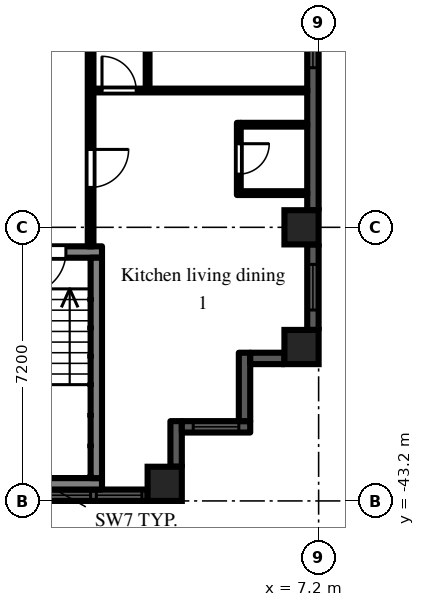
"""IFC4 building model, lengths in metres.
Left out: names, types, materials, properties, quantities, classifications, styles, units other than length and angle.
Written with IfcOpenShell. Run it as: python <this file> out.ifc"""

import sys

from ifc_helpers import new_model, si_unit, direction, frame, frame_2d, origin, origin_2d, place, context, subcontext, project, spatial, rectangle, extrude, element, fill, save


model = new_model("IFC4")
c1 = context("Model", 3, precision=1e-05, world=origin(), true_north=direction((0.0, 1.0)))
c2 = subcontext(c1, "Body", "Model", "MODEL_VIEW")
j1 = project(units=[si_unit("LENGTHUNIT", "METRE"), si_unit("PLANEANGLEUNIT", "RADIAN")], contexts=[c1])
p1 = place(None, origin())
s1 = spatial("IfcSite", under=j1, at=p1, CompositionType="ELEMENT")
p2 = place(p1, origin())
s2 = spatial("IfcBuilding", under=s1, at=p2, CompositionType="ELEMENT")
p3 = place(p2, frame((0.0, 0.0, 108.9)))
s3 = spatial("IfcBuildingStorey", under=s2, at=p3, CompositionType="ELEMENT", Elevation=108.9)
for number, where, z_axis, x_axis in (
    (1, (3.15, -42.75, 0.0), (0.0, 0.0, 1.0), (1.0, 0.0, 0.0)),
    (2, (6.75, -39.15, 0.0), (0.0, 0.0, 1.0), (1.0, 0.0, 0.0)),
    (3, (6.75, -36.0, 0.0), (0.0, 0.0, 1.0), (1.0, 0.0, 0.0)),
):
    element("IfcColumn", number, at=place(p3, frame(where, z_axis=z_axis, x_axis=x_axis)), inside=s3, PredefinedType="COLUMN", context=c2, shape_type="SweptSolid", body=[
        extrude(rectangle(XDim=0.9, YDim=0.9, at=origin_2d()), origin(), (0.0, 0.0, 1.0), 3.0),
    ])
p4 = place(p3, frame((-2.7, -43.05, 0.0), z_axis=(0.0, 0.0, 1.0), x_axis=(1.0, 0.0, 0.0)))
e4 = element("IfcWall", 4, at=p4, inside=s3, PredefinedType="SOLIDWALL", context=c2, shape_type="SweptSolid", body=[
    extrude(rectangle(XDim=5.4, YDim=0.3, at=frame_2d((2.7, 0.0))), origin(), (0.0, 0.0, 1.0), 2.2),
])
p5 = place(p4, frame((1.5, 0.0, 0.2)))
e5 = element("IfcOpeningElement", 5, at=p5, cuts=e4, PredefinedType="OPENING", context=c2, shape_type="SweptSolid", body=[
    extrude(rectangle(XDim=2.4, YDim=1.85, at=frame_2d((1.2, 0.925))), frame((0.0, 0.16, 0.0), z_axis=(0.0, -1.0, 0.0), x_axis=(1.0, 0.0, 0.0)), (0.0, 0.0, 1.0), 0.32),
])
p6 = place(p4, frame((0.15, 0.0, 0.2)))
e6 = element("IfcOpeningElement", 6, at=p6, cuts=e4, PredefinedType="OPENING", context=c2, shape_type="SweptSolid", body=[
    extrude(rectangle(XDim=1.2, YDim=1.85, at=frame_2d((0.6, 0.925))), frame((0.0, 0.16, 0.0), z_axis=(0.0, -1.0, 0.0), x_axis=(1.0, 0.0, 0.0)), (0.0, 0.0, 1.0), 0.32),
])
p7 = place(p4, frame((4.05, 0.0, 0.2)))
e7 = element("IfcOpeningElement", 7, at=p7, cuts=e4, PredefinedType="OPENING", context=c2, shape_type="SweptSolid", body=[
    extrude(rectangle(XDim=1.2, YDim=1.85, at=frame_2d((0.6, 0.925))), frame((0.0, 0.16, 0.0), z_axis=(0.0, -1.0, 0.0), x_axis=(1.0, 0.0, 0.0)), (0.0, 0.0, 1.0), 0.32),
])
p8 = place(p3, frame((3.45, -42.3, 0.0), z_axis=(0.0, 0.0, 1.0), x_axis=(0.0, 1.0, 0.0)))
e8 = element("IfcWall", 8, at=p8, inside=s3, PredefinedType="SOLIDWALL", context=c2, shape_type="SweptSolid", body=[
    extrude(rectangle(XDim=1.2, YDim=0.3, at=frame_2d((0.6, 0.0))), origin(), (0.0, 0.0, 1.0), 2.55),
])
p9 = place(p3, frame((3.6, -41.25, 0.0), z_axis=(0.0, 0.0, 1.0), x_axis=(1.0, 0.0, 0.0)))
e9 = element("IfcWall", 9, at=p9, inside=s3, PredefinedType="SOLIDWALL", context=c2, shape_type="SweptSolid", body=[
    extrude(rectangle(XDim=1.8, YDim=0.3, at=frame_2d((0.9, 0.0))), origin(), (0.0, 0.0, 1.0), 2.55),
])
p10 = place(p9, frame((0.3, 0.0, 0.2)))
e10 = element("IfcOpeningElement", 10, at=p10, cuts=e9, PredefinedType="OPENING", context=c2, shape_type="SweptSolid", body=[
    extrude(rectangle(XDim=1.2, YDim=1.85, at=frame_2d((0.6, 0.925))), frame((0.0, 0.16, 0.0), z_axis=(0.0, -1.0, 0.0), x_axis=(1.0, 0.0, 0.0)), (0.0, 0.0, 1.0), 0.32),
])
p11 = place(p3, frame((5.25, -41.1, 0.0), z_axis=(0.0, 0.0, 1.0), x_axis=(0.0, 1.0, 0.0)))
e11 = element("IfcWall", 11, at=p11, inside=s3, PredefinedType="SOLIDWALL", context=c2, shape_type="SweptSolid", body=[
    extrude(rectangle(XDim=1.8, YDim=0.3, at=frame_2d((0.9, 0.0))), origin(), (0.0, 0.0, 1.0), 2.55),
])
p12 = place(p3, frame((5.4, -39.45, 0.0), z_axis=(0.0, 0.0, 1.0), x_axis=(1.0, 0.0, 0.0)))
e12 = element("IfcWall", 12, at=p12, inside=s3, PredefinedType="SOLIDWALL", context=c2, shape_type="SweptSolid", body=[
    extrude(rectangle(XDim=0.9, YDim=0.3, at=frame_2d((0.45, 0.0))), origin(), (0.0, 0.0, 1.0), 2.55),
])
p13 = place(p3, frame((7.05, -38.7, 0.0), z_axis=(0.0, 0.0, 1.0), x_axis=(0.0, 1.0, 0.0)))
e13 = element("IfcWall", 13, at=p13, inside=s3, PredefinedType="SOLIDWALL", context=c2, shape_type="SweptSolid", body=[
    extrude(rectangle(XDim=2.25, YDim=0.3, at=frame_2d((1.125, 0.0))), origin(), (0.0, 0.0, 1.0), 2.2),
])
p14 = place(p13, frame((0.525, 0.0, 0.2)))
e14 = element("IfcOpeningElement", 14, at=p14, cuts=e13, PredefinedType="OPENING", context=c2, shape_type="SweptSolid", body=[
    extrude(rectangle(XDim=1.2, YDim=1.85, at=frame_2d((0.6, 0.925))), frame((0.0, 0.16, 0.0), z_axis=(0.0, -1.0, 0.0), x_axis=(1.0, 0.0, 0.0)), (0.0, 0.0, 1.0), 0.32),
])
p15 = place(p3, frame((7.05, -35.55, 0.0), z_axis=(0.0, 0.0, 1.0), x_axis=(0.0, 1.0, 0.0)))
e15 = element("IfcWall", 15, at=p15, inside=s3, PredefinedType="SOLIDWALL", context=c2, shape_type="SweptSolid", body=[
    extrude(rectangle(XDim=6.3, YDim=0.3, at=frame_2d((3.15, 0.0))), origin(), (0.0, 0.0, 1.0), 2.2),
])
p16 = place(p15, frame((3.75, 0.0, 0.2)))
e16 = element("IfcOpeningElement", 16, at=p16, cuts=e15, PredefinedType="OPENING", context=c2, shape_type="SweptSolid", body=[
    extrude(rectangle(XDim=2.4, YDim=1.85, at=frame_2d((1.2, 0.925))), frame((0.0, 0.16, 0.0), z_axis=(0.0, -1.0, 0.0), x_axis=(1.0, 0.0, 0.0)), (0.0, 0.0, 1.0), 0.32),
])
p17 = place(p3, frame((-1.5, -36.65, 0.0), z_axis=(0.0, 0.0, 1.0), x_axis=(1.0, 0.0, 0.0)))
e17 = element("IfcWall", 17, at=p17, inside=s3, PredefinedType="SHEAR", context=c2, shape_type="SweptSolid", body=[
    extrude(rectangle(XDim=3.0, YDim=0.3, at=frame_2d((1.5, 0.0))), origin(), (0.0, 0.0, 1.0), 2.55),
])
p18 = place(p17, frame((0.95, 0.0, 0.0)))
e18 = element("IfcOpeningElement", 18, at=p18, cuts=e17, PredefinedType="OPENING", context=c2, shape_type="SweptSolid", body=[
    extrude(rectangle(XDim=1.1, YDim=2.1, at=frame_2d((0.55, 1.05))), frame((0.0, 0.16, 0.0), z_axis=(0.0, -1.0, 0.0), x_axis=(1.0, 0.0, 0.0)), (0.0, 0.0, 1.0), 0.32),
])
p19 = place(p3, frame((-1.5, -42.75, 0.0), z_axis=(0.0, 0.0, 1.0), x_axis=(1.0, 0.0, 0.0)))
e19 = element("IfcWall", 19, at=p19, inside=s3, PredefinedType="SHEAR", context=c2, shape_type="SweptSolid", body=[
    extrude(rectangle(XDim=3.0, YDim=0.3, at=frame_2d((1.5, 0.0))), origin(), (0.0, 0.0, 1.0), 2.55),
])
p20 = place(p3, frame((1.35, -36.8, 0.0), z_axis=(0.0, 0.0, 1.0), x_axis=(0.0, -1.0, 0.0)))
e20 = element("IfcWall", 20, at=p20, inside=s3, PredefinedType="SHEAR", context=c2, shape_type="SweptSolid", body=[
    extrude(rectangle(XDim=5.8, YDim=0.3, at=frame_2d((2.9, 0.0))), origin(), (0.0, 0.0, 1.0), 2.55),
])
p21 = place(p3, frame((1.2, -36.5, 0.0), z_axis=(0.0, 0.0, 1.0), x_axis=(0.0, 1.0, 0.0)))
e21 = element("IfcWall", 21, at=p21, inside=s3, PredefinedType="PARTITIONING", context=c2, shape_type="SweptSolid", body=[
    extrude(rectangle(XDim=35.375, YDim=0.15, at=frame_2d((17.688, 0.0))), origin(), (0.0, 0.0, 1.0), 2.55),
])
p22 = place(p21, frame((33.65, 0.0, 0.0)))
e22 = element("IfcOpeningElement", 22, at=p22, cuts=e21, PredefinedType="OPENING", context=c2, shape_type="SweptSolid", body=[
    extrude(rectangle(XDim=0.9, YDim=2.1, at=frame_2d((0.45, 1.05))), frame((0.0, 0.085, 0.0), z_axis=(0.0, -1.0, 0.0), x_axis=(1.0, 0.0, 0.0)), (0.0, 0.0, 1.0), 0.17),
])
p23 = place(p21, frame((30.65, 0.0, 0.0)))
e23 = element("IfcOpeningElement", 23, at=p23, cuts=e21, PredefinedType="OPENING", context=c2, shape_type="SweptSolid", body=[
    extrude(rectangle(XDim=0.9, YDim=2.1, at=frame_2d((0.45, 1.05))), frame((0.0, 0.085, 0.0), z_axis=(0.0, -1.0, 0.0), x_axis=(1.0, 0.0, 0.0)), (0.0, 0.0, 1.0), 0.17),
])
p24 = place(p21, frame((23.45, 0.0, 0.0)))
e24 = element("IfcOpeningElement", 24, at=p24, cuts=e21, PredefinedType="OPENING", context=c2, shape_type="SweptSolid", body=[
    extrude(rectangle(XDim=0.9, YDim=2.1, at=frame_2d((0.45, 1.05))), frame((0.0, 0.085, 0.0), z_axis=(0.0, -1.0, 0.0), x_axis=(1.0, 0.0, 0.0)), (0.0, 0.0, 1.0), 0.17),
])
p25 = place(p21, frame((20.75, 0.0, 0.0)))
e25 = element("IfcOpeningElement", 25, at=p25, cuts=e21, PredefinedType="OPENING", context=c2, shape_type="SweptSolid", body=[
    extrude(rectangle(XDim=0.9, YDim=2.1, at=frame_2d((0.45, 1.05))), frame((0.0, 0.085, 0.0), z_axis=(0.0, -1.0, 0.0), x_axis=(1.0, 0.0, 0.0)), (0.0, 0.0, 1.0), 0.17),
])
p26 = place(p21, frame((18.95, 0.0, 0.0)))
e26 = element("IfcOpeningElement", 26, at=p26, cuts=e21, PredefinedType="OPENING", context=c2, shape_type="SweptSolid", body=[
    extrude(rectangle(XDim=0.9, YDim=2.1, at=frame_2d((0.45, 1.05))), frame((0.0, 0.085, 0.0), z_axis=(0.0, -1.0, 0.0), x_axis=(1.0, 0.0, 0.0)), (0.0, 0.0, 1.0), 0.17),
])
p27 = place(p21, frame((1.55, 0.0, 0.0)))
e27 = element("IfcOpeningElement", 27, at=p27, cuts=e21, PredefinedType="OPENING", context=c2, shape_type="SweptSolid", body=[
    extrude(rectangle(XDim=1.0, YDim=2.1, at=frame_2d((0.5, 1.05))), frame((0.0, 0.085, 0.0), z_axis=(0.0, -1.0, 0.0), x_axis=(1.0, 0.0, 0.0)), (0.0, 0.0, 1.0), 0.17),
])
p28 = place(p3, frame((1.275, -32.4, 0.0), z_axis=(0.0, 0.0, 1.0), x_axis=(1.0, 0.0, 0.0)))
e28 = element("IfcWall", 28, at=p28, inside=s3, PredefinedType="PARTITIONING", context=c2, shape_type="SweptSolid", body=[
    extrude(rectangle(XDim=5.625, YDim=0.1, at=frame_2d((2.812, 0.0))), origin(), (0.0, 0.0, 1.0), 2.55),
])
p29 = place(p28, frame((0.225, 0.0, 0.0)))
e29 = element("IfcOpeningElement", 29, at=p29, cuts=e28, PredefinedType="OPENING", context=c2, shape_type="SweptSolid", body=[
    extrude(rectangle(XDim=0.9, YDim=2.1, at=frame_2d((0.45, 1.05))), frame((0.0, 0.06, 0.0), z_axis=(0.0, -1.0, 0.0), x_axis=(1.0, 0.0, 0.0)), (0.0, 0.0, 1.0), 0.12),
])
p30 = place(p3, frame((2.7, -32.35, 0.0), z_axis=(0.0, 0.0, 1.0), x_axis=(0.0, 1.0, 0.0)))
e30 = element("IfcWall", 30, at=p30, inside=s3, PredefinedType="PARTITIONING", context=c2, shape_type="SweptSolid", body=[
    extrude(rectangle(XDim=14.275, YDim=0.1, at=frame_2d((7.138, 0.0))), origin(), (0.0, 0.0, 1.0), 2.55),
])
p31 = place(p30, frame((1.12, 0.0, 0.0)))
e31 = element("IfcOpeningElement", 31, at=p31, cuts=e30, PredefinedType="OPENING", context=c2, shape_type="SweptSolid", body=[
    extrude(rectangle(XDim=0.9, YDim=2.1, at=frame_2d((0.45, 1.05))), frame((0.0, 0.06, 0.0), z_axis=(0.0, -1.0, 0.0), x_axis=(1.0, 0.0, 0.0)), (0.0, 0.0, 1.0), 0.12),
])
p32 = place(p30, frame((12.28, 0.0, 0.0)))
e32 = element("IfcOpeningElement", 32, at=p32, cuts=e30, PredefinedType="OPENING", context=c2, shape_type="SweptSolid", body=[
    extrude(rectangle(XDim=0.9, YDim=2.1, at=frame_2d((0.45, 1.05))), frame((0.0, 0.06, 0.0), z_axis=(0.0, -1.0, 0.0), x_axis=(1.0, 0.0, 0.0)), (0.0, 0.0, 1.0), 0.12),
])
p33 = place(p3, frame((5.1, -35.15, 0.0), z_axis=(0.0, 0.0, 1.0), x_axis=(0.0, 1.0, 0.0)))
e33 = element("IfcWall", 33, at=p33, inside=s3, PredefinedType="PARTITIONING", context=c2, shape_type="SweptSolid", body=[
    extrude(rectangle(XDim=1.9, YDim=0.1, at=frame_2d((0.95, 0.0))), origin(), (0.0, 0.0, 1.0), 2.55),
])
p34 = place(p33, frame((0.55, 0.0, 0.0)))
e34 = element("IfcOpeningElement", 34, at=p34, cuts=e33, PredefinedType="OPENING", context=c2, shape_type="SweptSolid", body=[
    extrude(rectangle(XDim=0.8, YDim=2.1, at=frame_2d((0.4, 1.05))), frame((0.0, 0.06, 0.0), z_axis=(0.0, -1.0, 0.0), x_axis=(1.0, 0.0, 0.0)), (0.0, 0.0, 1.0), 0.12),
])
for number, where, z_axis, x_axis in (
    (35, (5.15, -35.1, 0.0), (0.0, 0.0, 1.0), (1.0, 0.0, 0.0)),
    (36, (5.15, -33.3, 0.0), (0.0, 0.0, 1.0), (1.0, 0.0, 0.0)),
):
    element("IfcWall", number, at=place(p3, frame(where, z_axis=z_axis, x_axis=x_axis)), inside=s3, PredefinedType="PARTITIONING", context=c2, shape_type="SweptSolid", body=[
        extrude(rectangle(XDim=1.75, YDim=0.1, at=frame_2d((0.875, 0.0))), origin(), (0.0, 0.0, 1.0), 2.55),
    ])
p35 = place(p5, origin())
e37 = element("IfcWindow", 37, at=p35, inside=s3, PartitioningType="SINGLE_PANEL", PredefinedType="WINDOW", context=c2, shape_type="SweptSolid", body=[
    extrude(rectangle(XDim=2.4, YDim=1.85, at=frame_2d((1.2, 0.925))), frame((0.0, 0.03, 0.0), z_axis=(0.0, -1.0, 0.0), x_axis=(1.0, 0.0, 0.0)), (0.0, 0.0, 1.0), 0.06),
])
fill(e5, e37)
p36 = place(p7, origin())
e38 = element("IfcWindow", 38, at=p36, inside=s3, PartitioningType="SINGLE_PANEL", PredefinedType="WINDOW", context=c2, shape_type="SweptSolid", body=[
    extrude(rectangle(XDim=1.2, YDim=1.85, at=frame_2d((0.6, 0.925))), frame((0.0, 0.03, 0.0), z_axis=(0.0, -1.0, 0.0), x_axis=(1.0, 0.0, 0.0)), (0.0, 0.0, 1.0), 0.06),
])
fill(e7, e38)
p37 = place(p10, origin())
e39 = element("IfcWindow", 39, at=p37, inside=s3, PartitioningType="SINGLE_PANEL", PredefinedType="WINDOW", context=c2, shape_type="SweptSolid", body=[
    extrude(rectangle(XDim=1.2, YDim=1.85, at=frame_2d((0.6, 0.925))), frame((0.0, 0.03, 0.0), z_axis=(0.0, -1.0, 0.0), x_axis=(1.0, 0.0, 0.0)), (0.0, 0.0, 1.0), 0.06),
])
fill(e10, e39)
p38 = place(p14, origin())
e40 = element("IfcWindow", 40, at=p38, inside=s3, PartitioningType="SINGLE_PANEL", PredefinedType="WINDOW", context=c2, shape_type="SweptSolid", body=[
    extrude(rectangle(XDim=1.2, YDim=1.85, at=frame_2d((0.6, 0.925))), frame((0.0, 0.03, 0.0), z_axis=(0.0, -1.0, 0.0), x_axis=(1.0, 0.0, 0.0)), (0.0, 0.0, 1.0), 0.06),
])
fill(e14, e40)
p39 = place(p16, origin())
e41 = element("IfcWindow", 41, at=p39, inside=s3, PartitioningType="SINGLE_PANEL", PredefinedType="WINDOW", context=c2, shape_type="SweptSolid", body=[
    extrude(rectangle(XDim=2.4, YDim=1.85, at=frame_2d((1.2, 0.925))), frame((0.0, 0.03, 0.0), z_axis=(0.0, -1.0, 0.0), x_axis=(1.0, 0.0, 0.0)), (0.0, 0.0, 1.0), 0.06),
])
fill(e16, e41)
p40 = place(p18, frame((1.1, 0.0, 0.0), z_axis=(0.0, 0.0, 1.0), x_axis=(-1.0, 0.0, 0.0)))
e42 = element("IfcDoor", 42, at=p40, inside=s3, OperationType="SINGLE_SWING_RIGHT", PredefinedType="DOOR", context=c2, shape_type="SweptSolid", body=[
    extrude(rectangle(XDim=1.1, YDim=2.1, at=frame_2d((0.55, 1.05))), frame((0.0, 0.025, 0.0), z_axis=(0.0, -1.0, 0.0), x_axis=(1.0, 0.0, 0.0)), (0.0, 0.0, 1.0), 0.05),
])
fill(e18, e42)
p41 = place(p34, frame((0.8, 0.0, 0.0), z_axis=(0.0, 0.0, 1.0), x_axis=(-1.0, 0.0, 0.0)))
e43 = element("IfcDoor", 43, at=p41, inside=s3, OperationType="SINGLE_SWING_LEFT", PredefinedType="DOOR", context=c2, shape_type="SweptSolid", body=[
    extrude(rectangle(XDim=0.8, YDim=2.1, at=frame_2d((0.4, 1.05))), frame((0.0, 0.025, 0.0), z_axis=(0.0, -1.0, 0.0), x_axis=(1.0, 0.0, 0.0)), (0.0, 0.0, 1.0), 0.05),
])
fill(e34, e43)
p42 = place(p27, frame((1.0, 0.0, 0.0), z_axis=(0.0, 0.0, 1.0), x_axis=(-1.0, 0.0, 0.0)))
e44 = element("IfcDoor", 44, at=p42, inside=s3, OperationType="SINGLE_SWING_LEFT", PredefinedType="DOOR", context=c2, shape_type="SweptSolid", body=[
    extrude(rectangle(XDim=1.0, YDim=2.1, at=frame_2d((0.5, 1.05))), frame((0.0, 0.025, 0.0), z_axis=(0.0, -1.0, 0.0), x_axis=(1.0, 0.0, 0.0)), (0.0, 0.0, 1.0), 0.05),
])
fill(e27, e44)
p43 = place(p29, origin())
e45 = element("IfcDoor", 45, at=p43, inside=s3, OperationType="SINGLE_SWING_LEFT", PredefinedType="DOOR", context=c2, shape_type="SweptSolid", body=[
    extrude(rectangle(XDim=0.9, YDim=2.1, at=frame_2d((0.45, 1.05))), frame((0.0, 0.025, 0.0), z_axis=(0.0, -1.0, 0.0), x_axis=(1.0, 0.0, 0.0)), (0.0, 0.0, 1.0), 0.05),
])
fill(e29, e45)
save(model, sys.argv[1])
